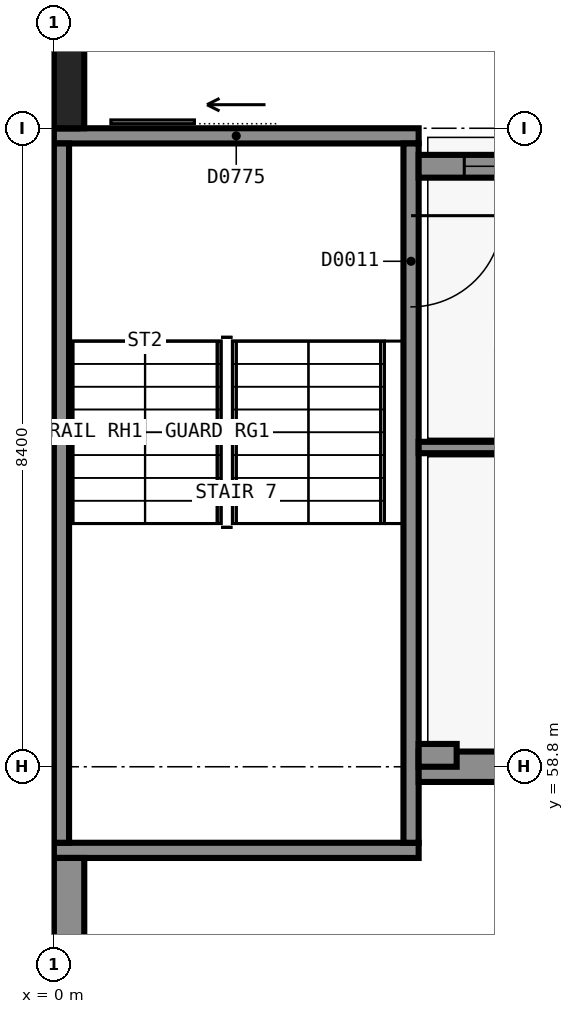
"""IFC4 building model, lengths in metres.
Left out: names, types, materials, properties, quantities, classifications, styles, units other than length and angle.
Written with IfcOpenShell. Run it as: python <this file> out.ifc"""

import sys

from ifc_helpers import new_model, si_unit, direction, frame, frame_2d, origin, origin_2d, place, context, subcontext, project, spatial, rectangle, extrude, element, fill, save


model = new_model("IFC4")
c1 = context("Model", 3, precision=1e-05, world=origin(), true_north=direction((0.0, 1.0)))
c2 = subcontext(c1, "Body", "Model", "MODEL_VIEW")
j1 = project(units=[si_unit("LENGTHUNIT", "METRE"), si_unit("PLANEANGLEUNIT", "RADIAN")], contexts=[c1])
p1 = place(None, origin())
s1 = spatial("IfcSite", under=j1, at=p1, CompositionType="ELEMENT")
p2 = place(p1, origin())
s2 = spatial("IfcBuilding", under=s1, at=p2, CompositionType="ELEMENT")
p3 = place(p2, origin())
s3 = spatial("IfcBuildingStorey", under=s2, at=p3, CompositionType="ELEMENT", Elevation=0.0)
p4 = place(p3, frame((4.8, 57.7, -0.3), z_axis=(0.0, 0.0, 1.0), x_axis=(-1.0, 0.0, 0.0)))
e1 = element("IfcWall", 1, at=p4, inside=s3, PredefinedType="SHEAR", context=c2, shape_type="SweptSolid", body=[
    extrude(rectangle(XDim=4.8, YDim=0.2, at=frame_2d((2.4, 0.0))), origin(), (0.0, 0.0, 1.0), 5.7),
])
p5 = place(p3, frame((0.0, 67.1, -0.3), z_axis=(0.0, 0.0, 1.0), x_axis=(1.0, 0.0, 0.0)))
e2 = element("IfcWall", 2, at=p5, inside=s3, PredefinedType="SHEAR", context=c2, shape_type="SweptSolid", body=[
    extrude(rectangle(XDim=4.8, YDim=0.2, at=frame_2d((2.4, 0.0))), origin(), (0.0, 0.0, 1.0), 5.7),
])
p6 = place(p5, frame((1.85, 0.0, 0.0)))
e3 = element("IfcOpeningElement", 3, at=p6, cuts=e2, PredefinedType="OPENING", context=c2, shape_type="SweptSolid", body=[
    extrude(rectangle(XDim=1.1, YDim=2.2, at=frame_2d((0.55, 1.1))), frame((0.0, 0.11, 0.0), z_axis=(0.0, -1.0, 0.0), x_axis=(1.0, 0.0, 0.0)), (0.0, 0.0, 1.0), 0.22),
])
p7 = place(p3, frame((0.1, 57.8, -0.3), z_axis=(0.0, 0.0, 1.0), x_axis=(0.0, 1.0, 0.0)))
e4 = element("IfcWall", 4, at=p7, inside=s3, PredefinedType="SHEAR", context=c2, shape_type="SweptSolid", body=[
    extrude(rectangle(XDim=9.2, YDim=0.2, at=frame_2d((4.6, 0.0))), origin(), (0.0, 0.0, 1.0), 5.7),
])
p8 = place(p3, frame((4.7, 67.0, -0.3), z_axis=(0.0, 0.0, 1.0), x_axis=(0.0, -1.0, 0.0)))
e5 = element("IfcWall", 5, at=p8, inside=s3, PredefinedType="SHEAR", context=c2, shape_type="SweptSolid", body=[
    extrude(rectangle(XDim=9.2, YDim=0.2, at=frame_2d((4.6, 0.0))), origin(), (0.0, 0.0, 1.0), 5.7),
])
p9 = place(p8, frame((0.95, 0.0, 0.3)))
e6 = element("IfcOpeningElement", 6, at=p9, cuts=e5, PredefinedType="OPENING", context=c2, shape_type="SweptSolid", body=[
    extrude(rectangle(XDim=1.2, YDim=2.1, at=frame_2d((0.6, 1.05))), frame((0.0, 0.11, 0.0), z_axis=(0.0, -1.0, 0.0), x_axis=(1.0, 0.0, 0.0)), (0.0, 0.0, 1.0), 0.22),
])
p10 = place(p3, frame((4.8, 58.8, -0.3), z_axis=(0.0, 0.0, 1.0), x_axis=(1.0, 0.0, 0.0)))
e7 = element("IfcWall", 7, at=p10, inside=s3, PredefinedType="SHEAR", context=c2, shape_type="SweptSolid", body=[
    extrude(rectangle(XDim=12.2, YDim=0.4, at=frame_2d((6.1, 0.0))), origin(), (0.0, 0.0, 1.0), 5.7),
])
p11 = place(p10, frame((4.95, 0.0, 0.3)))
e8 = element("IfcOpeningElement", 8, at=p11, cuts=e7, PredefinedType="OPENING", context=c2, shape_type="SweptSolid", body=[
    extrude(rectangle(XDim=1.8, YDim=2.1, at=frame_2d((0.9, 1.05))), frame((0.0, 0.21, 0.0), z_axis=(0.0, -1.0, 0.0), x_axis=(1.0, 0.0, 0.0)), (0.0, 0.0, 1.0), 0.42),
])
p12 = place(p3, frame((0.2, 43.2, -0.3), z_axis=(0.0, 0.0, 1.0), x_axis=(0.0, 1.0, 0.0)))
e9 = element("IfcWall", 9, at=p12, inside=s3, PredefinedType="SHEAR", context=c2, shape_type="SweptSolid", body=[
    extrude(rectangle(XDim=14.4, YDim=0.4, at=frame_2d((7.2, 0.0))), origin(), (0.0, 0.0, 1.0), 5.7),
])
p13 = place(p3, frame((0.15, 67.2, -1.2), z_axis=(0.0, 0.0, 1.0), x_axis=(0.0, 1.0, 0.0)))
e10 = element("IfcWall", 10, at=p13, inside=s3, PredefinedType="SOLIDWALL", context=c2, shape_type="SweptSolid", body=[
    extrude(rectangle(XDim=2.3, YDim=0.3, at=frame_2d((1.15, 0.0))), origin(), (0.0, 0.0, 1.0), 0.9),
])
p14 = place(p3, frame((5.3, 58.95, -1.2), z_axis=(0.0, 0.0, 1.0), x_axis=(-1.0, 0.0, 0.0)))
e11 = element("IfcWall", 11, at=p14, inside=s3, PredefinedType="SOLIDWALL", context=c2, shape_type="SweptSolid", body=[
    extrude(rectangle(XDim=0.5, YDim=0.3, at=frame_2d((0.25, 0.0))), origin(), (0.0, 0.0, 1.0), 0.9),
])
p15 = place(p3, frame((4.8, 66.7, 0.0), z_axis=(0.0, 0.0, 1.0), x_axis=(1.0, 0.0, 0.0)))
e12 = element("IfcWall", 12, at=p15, inside=s3, PredefinedType="SOLIDWALL", context=c2, shape_type="SweptSolid", body=[
    extrude(rectangle(XDim=24.0, YDim=0.3, at=frame_2d((12.0, 0.0))), origin(), (0.0, 0.0, 1.0), 5.1),
])
p16 = place(p15, frame((6.0, 0.0, 0.0)))
e13 = element("IfcOpeningElement", 13, at=p16, cuts=e12, PredefinedType="OPENING", context=c2, shape_type="SweptSolid", body=[
    extrude(rectangle(XDim=3.6, YDim=2.4, at=frame_2d((1.8, 1.2))), frame((0.0, 0.16, 0.0), z_axis=(0.0, -1.0, 0.0), x_axis=(1.0, 0.0, 0.0)), (0.0, 0.0, 1.0), 0.32),
])
p17 = place(p15, frame((0.6, 0.0, 0.9)))
e14 = element("IfcOpeningElement", 14, at=p17, cuts=e12, PredefinedType="OPENING", context=c2, shape_type="SweptSolid", body=[
    extrude(rectangle(XDim=1.8, YDim=1.5, at=frame_2d((0.9, 0.75))), frame((0.0, 0.16, 0.0), z_axis=(0.0, -1.0, 0.0), x_axis=(1.0, 0.0, 0.0)), (0.0, 0.0, 1.0), 0.32),
])
p18 = place(p15, frame((21.6, 0.0, 0.9)))
e15 = element("IfcOpeningElement", 15, at=p18, cuts=e12, PredefinedType="OPENING", context=c2, shape_type="SweptSolid", body=[
    extrude(rectangle(XDim=1.8, YDim=1.5, at=frame_2d((0.9, 0.75))), frame((0.0, 0.16, 0.0), z_axis=(0.0, -1.0, 0.0), x_axis=(1.0, 0.0, 0.0)), (0.0, 0.0, 1.0), 0.32),
])
p19 = place(p3, frame((0.2, 67.8, -0.3), z_axis=(0.0, 0.0, 1.0), x_axis=(1.0, 0.0, 0.0)))
e16 = element("IfcColumn", 16, at=p19, inside=s3, PredefinedType="PILASTER", context=c2, shape_type="SweptSolid", body=[
    extrude(rectangle(XDim=0.4, YDim=1.2, at=origin_2d()), origin(), (0.0, 0.0, 1.0), 5.7),
])
p20 = place(p3, frame((4.8, 63.0, 0.0), z_axis=(0.0, 0.0, 1.0), x_axis=(1.0, 0.0, 0.0)))
e17 = element("IfcWall", 17, at=p20, inside=s3, PredefinedType="PARTITIONING", context=c2, shape_type="SweptSolid", body=[
    extrude(rectangle(XDim=11.9, YDim=0.15, at=frame_2d((5.95, 0.0))), origin(), (0.0, 0.0, 1.0), 4.4),
])
p21 = place(p20, frame((1.3, 0.0, 0.0)))
e18 = element("IfcOpeningElement", 18, at=p21, cuts=e17, PredefinedType="OPENING", context=c2, shape_type="SweptSolid", body=[
    extrude(rectangle(XDim=1.0, YDim=2.1, at=frame_2d((0.5, 1.05))), frame((0.0, 0.085, 0.0), z_axis=(0.0, -1.0, 0.0), x_axis=(1.0, 0.0, 0.0)), (0.0, 0.0, 1.0), 0.17),
])
p22 = place(p6, origin())
e19 = element("IfcDoor", 19, at=p22, inside=s3, OperationType="SLIDING_TO_LEFT", PredefinedType="DOOR", context=c2, shape_type="SweptSolid", body=[
    extrude(rectangle(XDim=1.1, YDim=2.2, at=frame_2d((0.55, 1.1))), frame((0.0, 0.025, 0.0), z_axis=(0.0, -1.0, 0.0), x_axis=(1.0, 0.0, 0.0)), (0.0, 0.0, 1.0), 0.05),
])
fill(e3, e19)
p23 = place(p17, origin())
e20 = element("IfcWindow", 20, at=p23, inside=s3, PartitioningType="SINGLE_PANEL", PredefinedType="WINDOW", context=c2, shape_type="SweptSolid", body=[
    extrude(rectangle(XDim=1.8, YDim=1.5, at=frame_2d((0.9, 0.75))), frame((0.0, 0.03, 0.0), z_axis=(0.0, -1.0, 0.0), x_axis=(1.0, 0.0, 0.0)), (0.0, 0.0, 1.0), 0.06),
])
fill(e14, e20)
p24 = place(p9, origin())
e21 = element("IfcDoor", 21, at=p24, inside=s3, OperationType="SINGLE_SWING_RIGHT", PredefinedType="DOOR", context=c2, shape_type="SweptSolid", body=[
    extrude(rectangle(XDim=1.2, YDim=2.1, at=frame_2d((0.6, 1.05))), frame((0.0, 0.025, 0.0), z_axis=(0.0, -1.0, 0.0), x_axis=(1.0, 0.0, 0.0)), (0.0, 0.0, 1.0), 0.05),
])
fill(e6, e21)
save(model, sys.argv[1])
